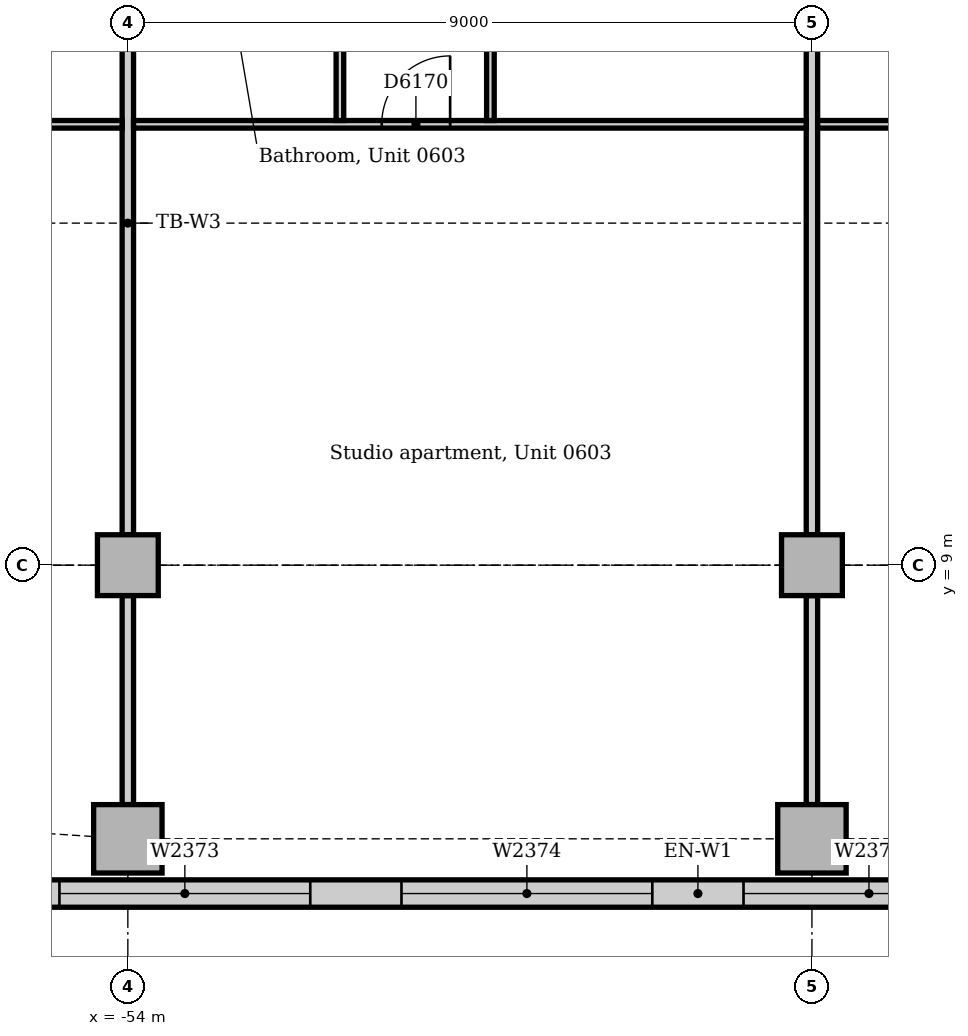
"""IFC4 building model, lengths in metres.
Left out: names, types, materials, properties, quantities, classifications, styles, units other than length and angle.
Written with IfcOpenShell. Run it as: python <this file> out.ifc"""

import sys

from ifc_helpers import new_model, si_unit, direction, frame, frame_2d, origin, origin_2d, place, context, subcontext, project, spatial, rectangle, extrude, element, fill, save


model = new_model("IFC4")
c1 = context("Model", 3, precision=1e-05, world=origin(), true_north=direction((0.0, 1.0)))
c2 = subcontext(c1, "Body", "Model", "MODEL_VIEW")
j1 = project(units=[si_unit("LENGTHUNIT", "METRE"), si_unit("PLANEANGLEUNIT", "RADIAN")], contexts=[c1])
p1 = place(None, origin())
s1 = spatial("IfcSite", under=j1, at=p1, CompositionType="ELEMENT")
p2 = place(p1, origin())
s2 = spatial("IfcBuilding", under=s1, at=p2, CompositionType="ELEMENT")
p3 = place(p2, frame((0.0, 0.0, 30.0)))
s3 = spatial("IfcBuildingStorey", under=s2, at=p3, CompositionType="ELEMENT", Elevation=30.0)
for number, where, z_axis, x_axis in (
    (1, (-54.0, 5.4, 0.0), (0.0, 0.0, 1.0), (1.0, 0.0, 0.0)),
    (2, (-45.0, 5.4, 0.0), (0.0, 0.0, 1.0), (1.0, 0.0, 0.0)),
):
    element("IfcColumn", number, at=place(p3, frame(where, z_axis=z_axis, x_axis=x_axis)), inside=s3, PredefinedType="COLUMN", context=c2, shape_type="SweptSolid", body=[
        extrude(rectangle(XDim=0.9, YDim=0.9, at=origin_2d()), origin(), (0.0, 0.0, 1.0), 3.85),
    ])
for number, where, z_axis, x_axis in (
    (3, (-54.0, 9.0, 0.0), (0.0, 0.0, 1.0), (1.0, 0.0, 0.0)),
    (4, (-45.0, 9.0, 0.0), (0.0, 0.0, 1.0), (1.0, 0.0, 0.0)),
):
    element("IfcColumn", number, at=place(p3, frame(where, z_axis=z_axis, x_axis=x_axis)), inside=s3, PredefinedType="COLUMN", context=c2, shape_type="SweptSolid", body=[
        extrude(rectangle(XDim=0.8, YDim=0.8, at=origin_2d()), origin(), (0.0, 0.0, 1.0), 3.85),
    ])
p4 = place(p3, frame((-61.757, 4.68, 0.0), z_axis=(0.0, 0.0, 1.0), x_axis=(1.0, 0.0, 0.0)))
e5 = element("IfcWall", 5, at=p4, inside=s3, PredefinedType="STANDARD", context=c2, shape_type="SweptSolid", body=[
    extrude(rectangle(XDim=30.515, YDim=0.36, at=frame_2d((15.257, 0.0))), origin(), (0.0, 0.0, 1.0), 3.85),
])
p5 = place(p4, frame((2.357, 0.0, 0.9)))
e6 = element("IfcOpeningElement", 6, at=p5, cuts=e5, PredefinedType="OPENING", context=c2, shape_type="SweptSolid", body=[
    extrude(rectangle(XDim=3.3, YDim=1.6, at=frame_2d((1.65, 0.8))), frame((0.0, 0.19, 0.0), z_axis=(0.0, -1.0, 0.0), x_axis=(1.0, 0.0, 0.0)), (0.0, 0.0, 1.0), 0.38),
])
p6 = place(p4, frame((6.857, 0.0, 0.9)))
e7 = element("IfcOpeningElement", 7, at=p6, cuts=e5, PredefinedType="OPENING", context=c2, shape_type="SweptSolid", body=[
    extrude(rectangle(XDim=3.3, YDim=1.6, at=frame_2d((1.65, 0.8))), frame((0.0, 0.19, 0.0), z_axis=(0.0, -1.0, 0.0), x_axis=(1.0, 0.0, 0.0)), (0.0, 0.0, 1.0), 0.38),
])
p7 = place(p4, frame((11.357, 0.0, 0.9)))
e8 = element("IfcOpeningElement", 8, at=p7, cuts=e5, PredefinedType="OPENING", context=c2, shape_type="SweptSolid", body=[
    extrude(rectangle(XDim=3.3, YDim=1.6, at=frame_2d((1.65, 0.8))), frame((0.0, 0.19, 0.0), z_axis=(0.0, -1.0, 0.0), x_axis=(1.0, 0.0, 0.0)), (0.0, 0.0, 1.0), 0.38),
])
p8 = place(p4, frame((15.857, 0.0, 0.9)))
e9 = element("IfcOpeningElement", 9, at=p8, cuts=e5, PredefinedType="OPENING", context=c2, shape_type="SweptSolid", body=[
    extrude(rectangle(XDim=3.3, YDim=1.6, at=frame_2d((1.65, 0.8))), frame((0.0, 0.19, 0.0), z_axis=(0.0, -1.0, 0.0), x_axis=(1.0, 0.0, 0.0)), (0.0, 0.0, 1.0), 0.38),
])
p9 = place(p4, frame((20.357, 0.0, 0.9)))
e10 = element("IfcOpeningElement", 10, at=p9, cuts=e5, PredefinedType="OPENING", context=c2, shape_type="SweptSolid", body=[
    extrude(rectangle(XDim=3.3, YDim=1.6, at=frame_2d((1.65, 0.8))), frame((0.0, 0.19, 0.0), z_axis=(0.0, -1.0, 0.0), x_axis=(1.0, 0.0, 0.0)), (0.0, 0.0, 1.0), 0.38),
])
p10 = place(p4, frame((24.857, 0.0, 0.9)))
e11 = element("IfcOpeningElement", 11, at=p10, cuts=e5, PredefinedType="OPENING", context=c2, shape_type="SweptSolid", body=[
    extrude(rectangle(XDim=3.3, YDim=1.6, at=frame_2d((1.65, 0.8))), frame((0.0, 0.19, 0.0), z_axis=(0.0, -1.0, 0.0), x_axis=(1.0, 0.0, 0.0)), (0.0, 0.0, 1.0), 0.38),
])
p11 = place(p3, frame((-54.0, 9.4, 0.0), z_axis=(0.0, 0.0, 1.0), x_axis=(0.0, 1.0, 0.0)))
e12 = element("IfcWall", 12, at=p11, inside=s3, PredefinedType="PARTITIONING", context=c2, shape_type="SweptSolid", body=[
    extrude(rectangle(XDim=8.2, YDim=0.15, at=frame_2d((4.1, 0.0))), origin(), (0.0, 0.0, 1.0), 3.158),
])
p12 = place(p3, frame((-54.0, 5.85, 0.0), z_axis=(0.0, 0.0, 1.0), x_axis=(0.0, 1.0, 0.0)))
e13 = element("IfcWall", 13, at=p12, inside=s3, PredefinedType="PARTITIONING", context=c2, shape_type="SweptSolid", body=[
    extrude(rectangle(XDim=2.75, YDim=0.15, at=frame_2d((1.375, 0.0))), origin(), (0.0, 0.0, 1.0), 3.652),
])
p13 = place(p3, frame((-45.0, 9.4, 0.0), z_axis=(0.0, 0.0, 1.0), x_axis=(0.0, 1.0, 0.0)))
e14 = element("IfcWall", 14, at=p13, inside=s3, PredefinedType="PARTITIONING", context=c2, shape_type="SweptSolid", body=[
    extrude(rectangle(XDim=8.2, YDim=0.15, at=frame_2d((4.1, 0.0))), origin(), (0.0, 0.0, 1.0), 3.158),
])
p14 = place(p3, frame((-45.0, 5.85, 0.0), z_axis=(0.0, 0.0, 1.0), x_axis=(0.0, 1.0, 0.0)))
e15 = element("IfcWall", 15, at=p14, inside=s3, PredefinedType="PARTITIONING", context=c2, shape_type="SweptSolid", body=[
    extrude(rectangle(XDim=2.75, YDim=0.15, at=frame_2d((1.375, 0.0))), origin(), (0.0, 0.0, 1.0), 3.652),
])
p15 = place(p3, frame((-61.05, 14.8, 0.0), z_axis=(0.0, 0.0, 1.0), x_axis=(1.0, 0.0, 0.0)))
e16 = element("IfcWall", 16, at=p15, inside=s3, PredefinedType="PARTITIONING", context=c2, shape_type="SweptSolid", body=[
    extrude(rectangle(XDim=6.975, YDim=0.1, at=frame_2d((3.487, 0.0))), origin(), (0.0, 0.0, 1.0), 3.85),
])
p16 = place(p15, frame((2.52, 0.0, 0.0)))
e17 = element("IfcOpeningElement", 17, at=p16, cuts=e16, PredefinedType="OPENING", context=c2, shape_type="SweptSolid", body=[
    extrude(rectangle(XDim=0.9, YDim=2.1, at=frame_2d((0.45, 1.05))), frame((0.0, 0.06, 0.0), z_axis=(0.0, -1.0, 0.0), x_axis=(1.0, 0.0, 0.0)), (0.0, 0.0, 1.0), 0.12),
])
p17 = place(p3, frame((-53.925, 14.8, 0.0), z_axis=(0.0, 0.0, 1.0), x_axis=(1.0, 0.0, 0.0)))
e18 = element("IfcWall", 18, at=p17, inside=s3, PredefinedType="PARTITIONING", context=c2, shape_type="SweptSolid", body=[
    extrude(rectangle(XDim=8.85, YDim=0.1, at=frame_2d((4.425, 0.0))), origin(), (0.0, 0.0, 1.0), 3.85),
])
p18 = place(p17, frame((3.265, 0.0, 0.0)))
e19 = element("IfcOpeningElement", 19, at=p18, cuts=e18, PredefinedType="OPENING", context=c2, shape_type="SweptSolid", body=[
    extrude(rectangle(XDim=0.9, YDim=2.1, at=frame_2d((0.45, 1.05))), frame((0.0, 0.06, 0.0), z_axis=(0.0, -1.0, 0.0), x_axis=(1.0, 0.0, 0.0)), (0.0, 0.0, 1.0), 0.12),
])
p19 = place(p3, frame((-44.925, 14.8, 0.0), z_axis=(0.0, 0.0, 1.0), x_axis=(1.0, 0.0, 0.0)))
e20 = element("IfcWall", 20, at=p19, inside=s3, PredefinedType="PARTITIONING", context=c2, shape_type="SweptSolid", body=[
    extrude(rectangle(XDim=8.85, YDim=0.1, at=frame_2d((4.425, 0.0))), origin(), (0.0, 0.0, 1.0), 3.85),
])
p20 = place(p19, frame((3.265, 0.0, 0.0)))
e21 = element("IfcOpeningElement", 21, at=p20, cuts=e20, PredefinedType="OPENING", context=c2, shape_type="SweptSolid", body=[
    extrude(rectangle(XDim=0.9, YDim=2.1, at=frame_2d((0.45, 1.05))), frame((0.0, 0.06, 0.0), z_axis=(0.0, -1.0, 0.0), x_axis=(1.0, 0.0, 0.0)), (0.0, 0.0, 1.0), 0.12),
])
p21 = place(p3, frame((-51.21, 14.85, 0.0), z_axis=(0.0, 0.0, 1.0), x_axis=(0.0, 1.0, 0.0)))
e22 = element("IfcWall", 22, at=p21, inside=s3, PredefinedType="PARTITIONING", context=c2, shape_type="SweptSolid", body=[
    extrude(rectangle(XDim=3.075, YDim=0.1, at=frame_2d((1.538, 0.0))), origin(), (0.0, 0.0, 1.0), 3.85),
])
p22 = place(p21, frame((1.1, 0.0, 0.0)))
e23 = element("IfcOpeningElement", 23, at=p22, cuts=e22, PredefinedType="OPENING", context=c2, shape_type="SweptSolid", body=[
    extrude(rectangle(XDim=0.9, YDim=2.1, at=frame_2d((0.45, 1.05))), frame((0.0, 0.06, 0.0), z_axis=(0.0, -1.0, 0.0), x_axis=(1.0, 0.0, 0.0)), (0.0, 0.0, 1.0), 0.12),
])
p23 = place(p3, frame((-49.23, 14.85, 0.0), z_axis=(0.0, 0.0, 1.0), x_axis=(0.0, 1.0, 0.0)))
e24 = element("IfcWall", 24, at=p23, inside=s3, PredefinedType="PARTITIONING", context=c2, shape_type="SweptSolid", body=[
    extrude(rectangle(XDim=3.075, YDim=0.1, at=frame_2d((1.538, 0.0))), origin(), (0.0, 0.0, 1.0), 3.85),
])
p24 = place(p23, frame((1.1, 0.0, 0.0)))
e25 = element("IfcOpeningElement", 25, at=p24, cuts=e24, PredefinedType="OPENING", context=c2, shape_type="SweptSolid", body=[
    extrude(rectangle(XDim=0.9, YDim=2.1, at=frame_2d((0.45, 1.05))), frame((0.0, 0.06, 0.0), z_axis=(0.0, -1.0, 0.0), x_axis=(1.0, 0.0, 0.0)), (0.0, 0.0, 1.0), 0.12),
])
p25 = place(p6, origin())
e26 = element("IfcWindow", 26, at=p25, inside=s3, PartitioningType="SINGLE_PANEL", PredefinedType="WINDOW", context=c2, shape_type="SweptSolid", body=[
    extrude(rectangle(XDim=3.3, YDim=1.6, at=frame_2d((1.65, 0.8))), frame((0.0, 0.13, 0.0), z_axis=(0.0, -1.0, 0.0), x_axis=(1.0, 0.0, 0.0)), (0.0, 0.0, 1.0), 0.06),
])
fill(e7, e26)
p26 = place(p7, origin())
e27 = element("IfcWindow", 27, at=p26, inside=s3, PartitioningType="SINGLE_PANEL", PredefinedType="WINDOW", context=c2, shape_type="SweptSolid", body=[
    extrude(rectangle(XDim=3.3, YDim=1.6, at=frame_2d((1.65, 0.8))), frame((0.0, 0.13, 0.0), z_axis=(0.0, -1.0, 0.0), x_axis=(1.0, 0.0, 0.0)), (0.0, 0.0, 1.0), 0.06),
])
fill(e8, e27)
p27 = place(p8, origin())
e28 = element("IfcWindow", 28, at=p27, inside=s3, PartitioningType="SINGLE_PANEL", PredefinedType="WINDOW", context=c2, shape_type="SweptSolid", body=[
    extrude(rectangle(XDim=3.3, YDim=1.6, at=frame_2d((1.65, 0.8))), frame((0.0, 0.13, 0.0), z_axis=(0.0, -1.0, 0.0), x_axis=(1.0, 0.0, 0.0)), (0.0, 0.0, 1.0), 0.06),
])
fill(e9, e28)
p28 = place(p18, origin())
e29 = element("IfcDoor", 29, at=p28, inside=s3, OperationType="SINGLE_SWING_RIGHT", PredefinedType="DOOR", context=c2, shape_type="SweptSolid", body=[
    extrude(rectangle(XDim=0.9, YDim=2.1, at=frame_2d((0.45, 1.05))), frame((0.0, 0.025, 0.0), z_axis=(0.0, -1.0, 0.0), x_axis=(1.0, 0.0, 0.0)), (0.0, 0.0, 1.0), 0.05),
])
fill(e19, e29)
save(model, sys.argv[1])
